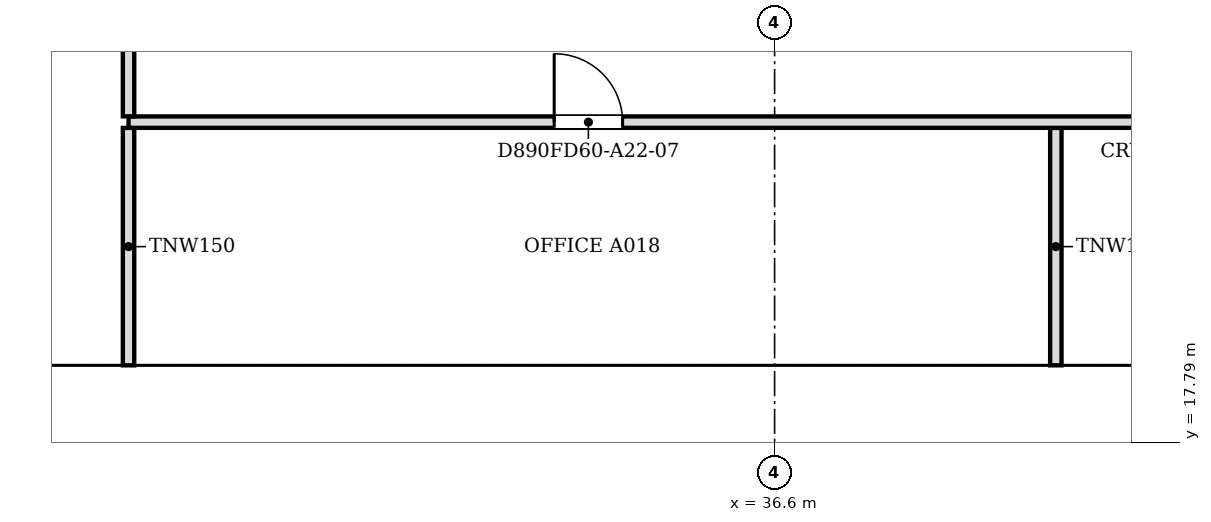
"""IFC4 building model, lengths in metres.
Left out: names, types, materials, properties, quantities, classifications, styles, units other than length and angle.
Written with IfcOpenShell. Run it as: python <this file> out.ifc"""

import sys

from ifc_helpers import new_model, si_unit, direction, frame, frame_2d, origin, place, context, subcontext, project, spatial, polyline, rectangle, outline, extrude, faceted_brep, source, transform, mapped, element, fill, save


model = new_model("IFC4")
c1 = context("Model", 3, precision=1e-05, world=origin(), true_north=direction((0.0, 1.0)))
c2 = subcontext(c1, "Body", "Model", "MODEL_VIEW")
j1 = project(units=[si_unit("LENGTHUNIT", "METRE"), si_unit("PLANEANGLEUNIT", "RADIAN")], contexts=[c1])
p1 = place(None, origin())
s1 = spatial("IfcSite", under=j1, at=p1, CompositionType="ELEMENT")
p2 = place(p1, origin())
s2 = spatial("IfcBuilding", under=s1, at=p2, CompositionType="ELEMENT")
p3 = place(p2, frame((0.0, 0.0, 252.1)))
s3 = spatial("IfcBuildingStorey", under=s2, at=p3, CompositionType="ELEMENT", Elevation=252.1)
m1 = source(origin(), c2, "Body", "Brep", [
    faceted_brep([(3.05, -0.25, 0.0), (6.1, -0.25, 3.8), (6.1, -0.25, 3.8), (3.05, -0.25, 7.6), (0.0, -0.25, 3.8), (0.0, 0.25, 3.8), (3.05, 0.25, 7.6), (6.1, 0.25, 3.8), (6.1, 0.25, 3.8), (3.05, 0.25, 0.0)], [[[0, 1, 2, 3, 4]], [[5, 6, 7, 8, 9]], [[9, 8, 1, 0]], [[7, 6, 3, 2]], [[6, 5, 4, 3]], [[5, 9, 0, 4]], [[1, 8, 7, 2]]]),
])
p4 = place(p3, frame((21.35, 18.55, -3.8), z_axis=(0.0, 0.0, 1.0), x_axis=(1.0, 0.0, 0.0)))
e1 = element("IfcWall", 1, at=p4, inside=s3, PredefinedType="SOLIDWALL", context=c2, shape_type="MappedRepresentation", body=[
    mapped(m1, transform((0.0, 0.0, 0.0), scale=1.0)),
])
m2 = source(origin(), c2, "Body", "SweptSolid", [
    extrude(outline(polyline([(3.05, 0.399), (5.78, 3.8), (3.05, 7.2), (0.321, 3.8), (3.05, 0.399)])), frame((0.0, 0.26, 0.0), z_axis=(0.0, -1.0, 0.0), x_axis=(1.0, 0.0, 0.0)), (0.0, 0.0, 1.0), 0.52),
])
p5 = place(p4, origin())
e2 = element("IfcOpeningElement", 2, at=p5, cuts=e1, PredefinedType="OPENING", context=c2, shape_type="MappedRepresentation", body=[
    mapped(m2, transform((0.0, 0.0, 0.0), scale=1.0)),
])
m3 = source(origin(), c2, "Body", "SweptSolid", [
    extrude(outline(polyline([(3.05, 0.0), (6.1, 3.8), (3.05, 7.6), (0.0, 3.8), (3.05, 0.0)])), frame((0.0, 0.25, 0.0), z_axis=(0.0, -1.0, 0.0), x_axis=(1.0, 0.0, 0.0)), (0.0, 0.0, 1.0), 0.5),
])
p6 = place(p3, frame((27.45, 18.55, -3.8), z_axis=(0.0, 0.0, 1.0), x_axis=(1.0, 0.0, 0.0)))
e3 = element("IfcWall", 3, at=p6, inside=s3, PredefinedType="SOLIDWALL", context=c2, shape_type="MappedRepresentation", body=[
    mapped(m3, transform((0.0, 0.0, 0.0), scale=1.0)),
])
p7 = place(p6, origin())
e4 = element("IfcOpeningElement", 4, at=p7, cuts=e3, PredefinedType="OPENING", context=c2, shape_type="MappedRepresentation", body=[
    mapped(m2, transform((0.0, 0.0, 0.0), scale=1.0)),
])
p8 = place(p3, frame((33.55, 18.55, -3.8), z_axis=(0.0, 0.0, 1.0), x_axis=(1.0, 0.0, 0.0)))
e5 = element("IfcWall", 5, at=p8, inside=s3, PredefinedType="SOLIDWALL", context=c2, shape_type="MappedRepresentation", body=[
    mapped(m1, transform((0.0, 0.0, 0.0), scale=1.0)),
])
p9 = place(p8, origin())
e6 = element("IfcOpeningElement", 6, at=p9, cuts=e5, PredefinedType="OPENING", context=c2, shape_type="MappedRepresentation", body=[
    mapped(m2, transform((0.0, 0.0, 0.0), scale=1.0)),
])
p10 = place(p3, frame((39.65, 18.55, -3.8), z_axis=(0.0, 0.0, 1.0), x_axis=(1.0, 0.0, 0.0)))
e7 = element("IfcWall", 7, at=p10, inside=s3, PredefinedType="SOLIDWALL", context=c2, shape_type="MappedRepresentation", body=[
    mapped(m3, transform((0.0, 0.0, 0.0), scale=1.0)),
])
p11 = place(p10, origin())
e8 = element("IfcOpeningElement", 8, at=p11, cuts=e7, PredefinedType="OPENING", context=c2, shape_type="MappedRepresentation", body=[
    mapped(m2, transform((0.0, 0.0, 0.0), scale=1.0)),
])
p12 = place(p2, frame((0.0, 0.0, 255.9)))
s4 = spatial("IfcBuildingStorey", under=s2, at=p12, CompositionType="ELEMENT", Elevation=255.9)
m4 = source(origin(), c2, "Body", "SweptSolid", [
    extrude(outline(polyline([(3.05, 0.0), (6.1, 3.8), (3.05, 7.6), (0.0, 3.8), (3.05, 0.0)])), frame((0.0, 0.25, 0.0), z_axis=(0.0, -1.0, 0.0), x_axis=(1.0, 0.0, 0.0)), (0.0, 0.0, 1.0), 0.5),
])
p13 = place(p12, frame((24.4, 18.55, -3.8), z_axis=(0.0, 0.0, 1.0), x_axis=(1.0, 0.0, 0.0)))
e9 = element("IfcWall", 9, at=p13, inside=s4, PredefinedType="SOLIDWALL", context=c2, shape_type="MappedRepresentation", body=[
    mapped(m4, transform((0.0, 0.0, 0.0), scale=1.0)),
])
m5 = source(origin(), c2, "Body", "SweptSolid", [
    extrude(outline(polyline([(3.05, 0.399), (5.78, 3.8), (3.05, 7.2), (0.321, 3.8), (3.05, 0.399)])), frame((0.0, 0.26, 0.0), z_axis=(0.0, -1.0, 0.0), x_axis=(1.0, 0.0, 0.0)), (0.0, 0.0, 1.0), 0.52),
])
p14 = place(p13, origin())
e10 = element("IfcOpeningElement", 10, at=p14, cuts=e9, PredefinedType="OPENING", context=c2, shape_type="MappedRepresentation", body=[
    mapped(m5, transform((0.0, 0.0, 0.0), scale=1.0)),
])
p15 = place(p12, frame((30.5, 18.55, -3.8), z_axis=(0.0, 0.0, 1.0), x_axis=(1.0, 0.0, 0.0)))
e11 = element("IfcWall", 11, at=p15, inside=s4, PredefinedType="SOLIDWALL", context=c2, shape_type="MappedRepresentation", body=[
    mapped(m4, transform((0.0, 0.0, 0.0), scale=1.0)),
])
p16 = place(p15, origin())
e12 = element("IfcOpeningElement", 12, at=p16, cuts=e11, PredefinedType="OPENING", context=c2, shape_type="MappedRepresentation", body=[
    mapped(m5, transform((0.0, 0.0, 0.0), scale=1.0)),
])
m6 = source(origin(), c2, "Body", "Brep", [
    faceted_brep([(3.05, -0.25, 0.0), (6.1, -0.25, 3.8), (6.1, -0.25, 3.8), (3.05, -0.25, 7.6), (0.0, -0.25, 3.8), (0.0, 0.25, 3.8), (3.05, 0.25, 7.6), (6.1, 0.25, 3.8), (6.1, 0.25, 3.8), (3.05, 0.25, 0.0)], [[[0, 1, 2, 3, 4]], [[5, 6, 7, 8, 9]], [[9, 8, 1, 0]], [[7, 6, 3, 2]], [[6, 5, 4, 3]], [[5, 9, 0, 4]], [[1, 8, 7, 2]]]),
])
p17 = place(p12, frame((36.6, 18.55, -3.8), z_axis=(0.0, 0.0, 1.0), x_axis=(1.0, 0.0, 0.0)))
e13 = element("IfcWall", 13, at=p17, inside=s4, PredefinedType="SOLIDWALL", context=c2, shape_type="MappedRepresentation", body=[
    mapped(m6, transform((0.0, 0.0, 0.0), scale=1.0)),
])
p18 = place(p17, origin())
e14 = element("IfcOpeningElement", 14, at=p18, cuts=e13, PredefinedType="OPENING", context=c2, shape_type="MappedRepresentation", body=[
    mapped(m5, transform((0.0, 0.0, 0.0), scale=1.0)),
])
for number, where, z_axis, x_axis in (
    (15, (28.1, 18.8, 0.0), (0.0, 0.0, 1.0), (0.0, 1.0, 0.0)),
    (16, (40.3, 18.8, 0.0), (0.0, 0.0, 1.0), (0.0, 1.0, 0.0)),
):
    element("IfcWall", number, at=place(p3, frame(where, z_axis=z_axis, x_axis=x_axis)), inside=s3, PredefinedType="PARTITIONING", context=c2, shape_type="SweptSolid", body=[
        extrude(rectangle(XDim=3.124, YDim=0.15, at=frame_2d((1.562, 0.0))), origin(), (0.0, 0.0, 1.0), 3.067),
    ])
p19 = place(p3, frame((57.3, 22.0, 0.0), z_axis=(0.0, 0.0, 1.0), x_axis=(-1.0, 0.0, 0.0)))
e17 = element("IfcWall", 17, at=p19, inside=s3, PredefinedType="PARTITIONING", context=c2, shape_type="SweptSolid", body=[
    extrude(rectangle(XDim=29.2, YDim=0.15, at=frame_2d((14.6, 0.0))), origin(), (0.0, 0.0, 1.0), 3.067),
])
m7 = source(origin(), c2, "Body", "SweptSolid", [
    extrude(rectangle(XDim=0.9, YDim=2.1, at=frame_2d((0.45, 1.05))), frame((0.0, 0.085, 0.0), z_axis=(0.0, -1.0, 0.0), x_axis=(1.0, 0.0, 0.0)), (0.0, 0.0, 1.0), 0.17),
])
p20 = place(p19, frame((22.7, 0.0, 0.0)))
e18 = element("IfcOpeningElement", 18, at=p20, cuts=e17, PredefinedType="OPENING", context=c2, shape_type="MappedRepresentation", body=[
    mapped(m7, transform((0.0, 0.0, 0.0), scale=1.0)),
])
p21 = place(p19, frame((8.1, 0.0, 0.0)))
e19 = element("IfcOpeningElement", 19, at=p21, cuts=e17, PredefinedType="OPENING", context=c2, shape_type="MappedRepresentation", body=[
    mapped(m7, transform((0.0, 0.0, 0.0), scale=1.0)),
])
p22 = place(p3, frame((28.1, 22.076, 0.0), z_axis=(0.0, 0.0, 1.0), x_axis=(0.0, 1.0, 0.0)))
e20 = element("IfcWall", 20, at=p22, inside=s3, PredefinedType="PARTITIONING", context=c2, shape_type="SweptSolid", body=[
    extrude(rectangle(XDim=23.548, YDim=0.15, at=frame_2d((11.774, 0.0))), origin(), (0.0, 0.0, 1.0), 3.067),
])
m8 = source(origin(), c2, "Body", "SweptSolid", [
    extrude(rectangle(XDim=1.0, YDim=2.1, at=frame_2d((0.5, 1.05))), frame((0.0, 0.085, 0.0), z_axis=(0.0, -1.0, 0.0), x_axis=(1.0, 0.0, 0.0)), (0.0, 0.0, 1.0), 0.17),
])
p23 = place(p22, frame((2.5, 0.0, 0.0)))
e21 = element("IfcOpeningElement", 21, at=p23, cuts=e20, PredefinedType="OPENING", context=c2, shape_type="MappedRepresentation", body=[
    mapped(m8, transform((0.0, 0.0, 0.0), scale=1.0)),
])
p24 = place(p22, frame((18.875, 0.0, 0.0)))
e22 = element("IfcOpeningElement", 22, at=p24, cuts=e20, PredefinedType="OPENING", context=c2, shape_type="MappedRepresentation", body=[
    mapped(m7, transform((0.0, 0.0, 0.0), scale=1.0)),
])
p25 = place(p22, frame((10.124, 0.0, 0.0)))
e23 = element("IfcOpeningElement", 23, at=p25, cuts=e20, PredefinedType="OPENING", context=c2, shape_type="MappedRepresentation", body=[
    mapped(m7, transform((0.0, 0.0, 0.0), scale=1.0)),
])
m9 = source(origin(), c2, "Body", "SweptSolid", [
    extrude(rectangle(XDim=0.9, YDim=2.1, at=frame_2d((0.45, 1.05))), frame((0.0, 0.025, 0.0), z_axis=(0.0, -1.0, 0.0), x_axis=(1.0, 0.0, 0.0)), (0.0, 0.0, 1.0), 0.05),
])
p26 = place(p20, origin())
e24 = element("IfcDoor", 24, at=p26, inside=s3, OperationType="SINGLE_SWING_RIGHT", PredefinedType="DOOR", context=c2, shape_type="MappedRepresentation", body=[
    mapped(m9, transform((0.0, 0.0, 0.0), scale=1.0)),
])
fill(e18, e24)
save(model, sys.argv[1])
